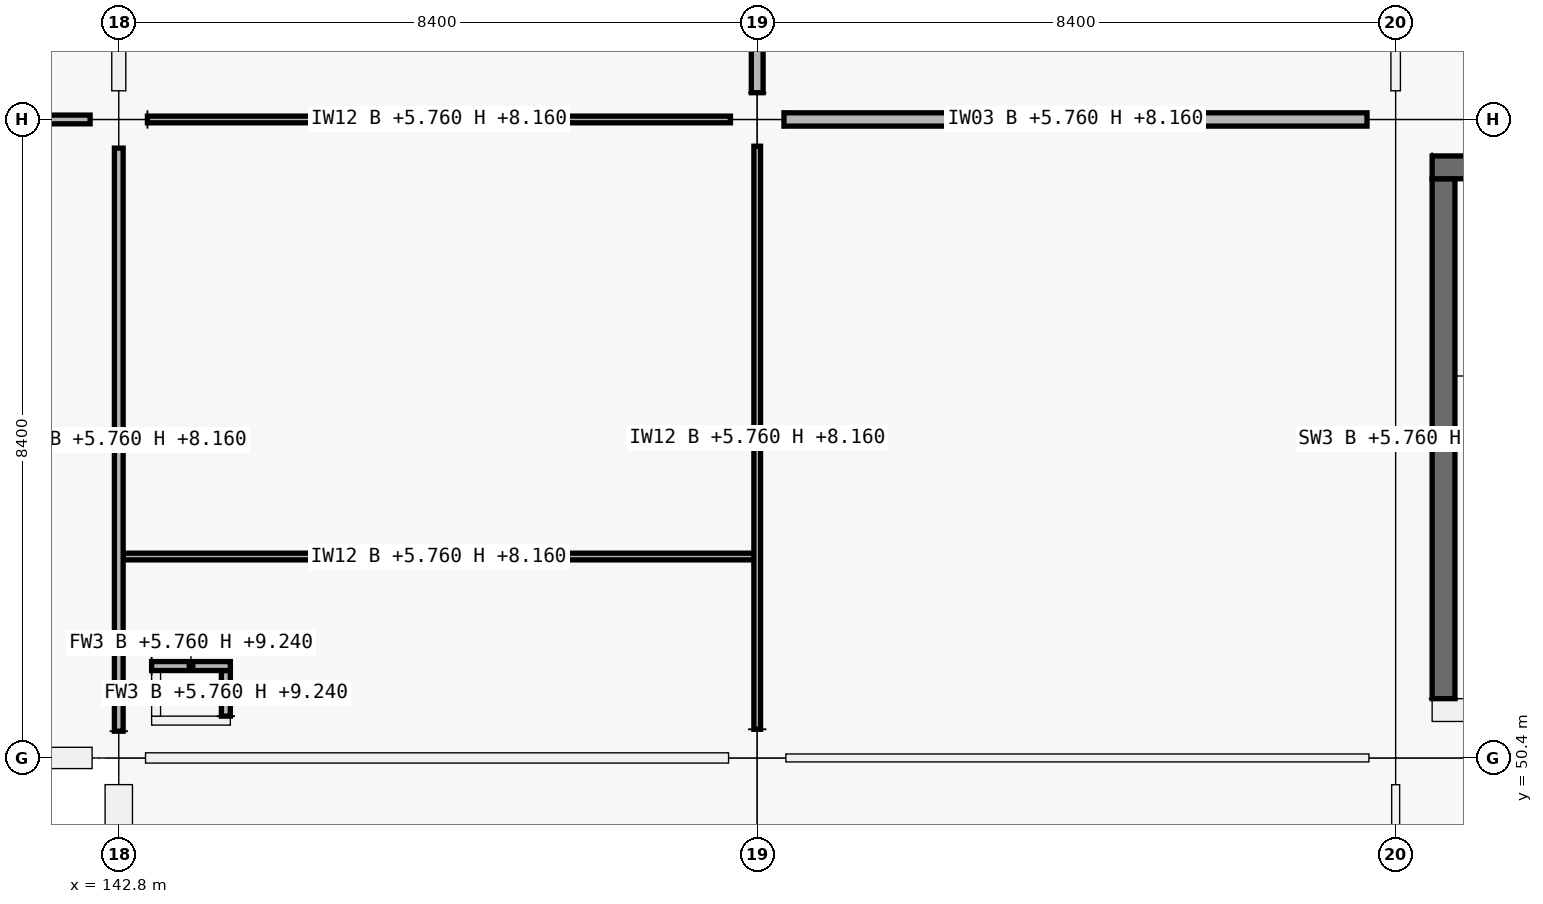
"""IFC4 building model, lengths in metres.
Left out: names, types, materials, properties, quantities, classifications, styles, units other than length and angle.
Written with IfcOpenShell. Run it as: python <this file> out.ifc"""

import sys

from ifc_helpers import new_model, si_unit, direction, frame, frame_2d, origin, origin_2d, place, context, subcontext, project, spatial, rectangle, extrude, element, fill, save


model = new_model("IFC4")
c1 = context("Model", 3, precision=1e-05, world=origin(), true_north=direction((0.0, 1.0)))
c2 = subcontext(c1, "Body", "Model", "MODEL_VIEW")
j1 = project(units=[si_unit("LENGTHUNIT", "METRE"), si_unit("PLANEANGLEUNIT", "RADIAN")], contexts=[c1])
p1 = place(None, origin())
s1 = spatial("IfcSite", under=j1, at=p1, CompositionType="ELEMENT")
p2 = place(p1, origin())
s2 = spatial("IfcBuilding", under=s1, at=p2, CompositionType="ELEMENT")
p3 = place(p2, frame((0.0, 0.0, 5.76)))
s3 = spatial("IfcBuildingStorey", under=s2, at=p3, CompositionType="ELEMENT", Elevation=5.76)
p4 = place(p3, frame((142.8, 50.4, 0.0), z_axis=(0.0, 0.0, 1.0), x_axis=(1.0, 0.0, 0.0)))
e1 = element("IfcColumn", 1, at=p4, inside=s3, PredefinedType="COLUMN", context=c2, shape_type="SweptSolid", body=[
    extrude(rectangle(XDim=0.7, YDim=0.7, at=origin_2d()), origin(), (0.0, 0.0, 1.0), 4.5),
])
for number, where, z_axis, x_axis in (
    (2, (142.8, 58.8, 0.0), (0.0, 0.0, 1.0), (1.0, 0.0, 0.0)),
    (3, (151.2, 50.4, 0.0), (0.0, 0.0, 1.0), (1.0, 0.0, 0.0)),
):
    element("IfcColumn", number, at=place(p3, frame(where, z_axis=z_axis, x_axis=x_axis)), inside=s3, PredefinedType="COLUMN", context=c2, shape_type="SweptSolid", body=[
        extrude(rectangle(XDim=0.75, YDim=0.75, at=origin_2d()), origin(), (0.0, 0.0, 1.0), 4.5),
    ])
for number, where, z_axis, x_axis in (
    (4, (151.2, 58.8, 0.0), (0.0, 0.0, 1.0), (1.0, 0.0, 0.0)),
    (5, (159.6, 50.4, 0.0), (0.0, 0.0, 1.0), (1.0, 0.0, 0.0)),
):
    element("IfcColumn", number, at=place(p3, frame(where, z_axis=z_axis, x_axis=x_axis)), inside=s3, PredefinedType="COLUMN", context=c2, shape_type="SweptSolid", body=[
        extrude(rectangle(XDim=0.7, YDim=0.7, at=origin_2d()), origin(), (0.0, 0.0, 1.0), 4.5),
    ])
p5 = place(p3, frame((159.6, 58.8, 0.0), z_axis=(0.0, 0.0, 1.0), x_axis=(1.0, 0.0, 0.0)))
e6 = element("IfcColumn", 6, at=p5, inside=s3, PredefinedType="COLUMN", context=c2, shape_type="SweptSolid", body=[
    extrude(rectangle(XDim=0.75, YDim=0.75, at=origin_2d()), origin(), (0.0, 0.0, 1.0), 4.5),
])
p6 = place(p3, frame((142.449, 50.4, 0.0), z_axis=(0.0, 0.0, 1.0), x_axis=(-1.0, 0.0, 0.0)))
e7 = element("IfcWall", 7, at=p6, inside=s3, PredefinedType="SOLIDWALL", context=c2, shape_type="SweptSolid", body=[
    extrude(rectangle(XDim=7.673, YDim=0.28, at=frame_2d((3.836, 0.0))), origin(), (0.0, 0.0, 1.0), 3.4),
])
p7 = place(p3, frame((142.8, 42.376, 0.0), z_axis=(0.0, 0.0, 1.0), x_axis=(0.0, 1.0, 0.0)))
e8 = element("IfcWall", 8, at=p7, inside=s3, PredefinedType="SOLIDWALL", context=c2, shape_type="SweptSolid", body=[
    extrude(rectangle(XDim=7.673, YDim=0.36, at=frame_2d((3.836, 0.0))), origin(), (0.0, 0.0, 1.0), 3.4),
])
p8 = place(p7, frame((3.386, 0.0, 0.9)))
e9 = element("IfcOpeningElement", 9, at=p8, cuts=e8, PredefinedType="OPENING", context=c2, shape_type="SweptSolid", body=[
    extrude(rectangle(XDim=0.9, YDim=1.5, at=frame_2d((0.45, 0.75))), frame((0.0, 0.18, 0.0), z_axis=(0.0, -1.0, 0.0), x_axis=(1.0, 0.0, 0.0)), (0.0, 0.0, 1.0), 0.36),
])
p9 = place(p3, frame((167.52, 51.03, 0.0), z_axis=(0.0, 0.0, 1.0), x_axis=(-1.0, 0.0, 0.0)))
e10 = element("IfcWall", 10, at=p9, inside=s3, PredefinedType="SHEAR", context=c2, shape_type="SweptSolid", body=[
    extrude(rectangle(XDim=7.44, YDim=0.3, at=frame_2d((3.72, 0.0))), origin(), (0.0, 0.0, 1.0), 4.5),
])
p10 = place(p9, frame((1.28, 0.0, 0.0)))
e11 = element("IfcOpeningElement", 11, at=p10, cuts=e10, PredefinedType="OPENING", context=c2, shape_type="SweptSolid", body=[
    extrude(rectangle(XDim=1.5, YDim=2.15, at=frame_2d((0.75, 1.075))), frame((0.0, 0.15, 0.0), z_axis=(0.0, -1.0, 0.0), x_axis=(1.0, 0.0, 0.0)), (0.0, 0.0, 1.0), 0.3),
])
p11 = place(p3, frame((160.23, 51.18, 0.0), z_axis=(0.0, 0.0, 1.0), x_axis=(0.0, 1.0, 0.0)))
e12 = element("IfcWall", 12, at=p11, inside=s3, PredefinedType="SHEAR", context=c2, shape_type="SweptSolid", body=[
    extrude(rectangle(XDim=6.84, YDim=0.3, at=frame_2d((3.42, 0.0))), origin(), (0.0, 0.0, 1.0), 4.5),
])
p12 = place(p3, frame((160.08, 58.17, 0.0), z_axis=(0.0, 0.0, 1.0), x_axis=(1.0, 0.0, 0.0)))
e13 = element("IfcWall", 13, at=p12, inside=s3, PredefinedType="SHEAR", context=c2, shape_type="SweptSolid", body=[
    extrude(rectangle(XDim=7.44, YDim=0.3, at=frame_2d((3.72, 0.0))), origin(), (0.0, 0.0, 1.0), 4.5),
])
for number, where, z_axis, x_axis in (
    (14, (143.232, 50.891, 0.0), (0.0, 0.0, 1.0), (1.0, 0.0, 0.0)),
    (15, (143.232, 51.609, 0.0), (0.0, 0.0, 1.0), (1.0, 0.0, 0.0)),
):
    element("IfcWall", number, at=place(p3, frame(where, z_axis=z_axis, x_axis=x_axis)), inside=s3, PredefinedType="PARTITIONING", context=c2, shape_type="SweptSolid", body=[
        extrude(rectangle(XDim=1.036, YDim=0.118, at=frame_2d((0.518, 0.0))), origin(), (0.0, 0.0, 1.0), 3.48),
    ])
for number, where, z_axis, x_axis in (
    (16, (143.291, 50.95, 0.0), (0.0, 0.0, 1.0), (0.0, 1.0, 0.0)),
    (17, (144.209, 50.95, 0.0), (0.0, 0.0, 1.0), (0.0, 1.0, 0.0)),
):
    element("IfcWall", number, at=place(p3, frame(where, z_axis=z_axis, x_axis=x_axis)), inside=s3, PredefinedType="PARTITIONING", context=c2, shape_type="SweptSolid", body=[
        extrude(rectangle(XDim=0.6, YDim=0.118, at=frame_2d((0.3, 0.0))), origin(), (0.0, 0.0, 1.0), 3.48),
    ])
p13 = place(p3, frame((134.752, 58.8, 0.0), z_axis=(0.0, 0.0, 1.0), x_axis=(1.0, 0.0, 0.0)))
e18 = element("IfcWall", 18, at=p13, inside=s3, PredefinedType="PARTITIONING", context=c2, shape_type="SweptSolid", body=[
    extrude(rectangle(XDim=7.671, YDim=0.115, at=frame_2d((3.835, 0.0))), origin(), (0.0, 0.0, 1.0), 2.4),
])
p14 = place(p13, frame((3.356, 0.0, 0.0)))
e19 = element("IfcOpeningElement", 19, at=p14, cuts=e18, PredefinedType="OPENING", context=c2, shape_type="SweptSolid", body=[
    extrude(rectangle(XDim=0.96, YDim=2.18, at=frame_2d((0.48, 1.09))), frame((0.0, 0.058, 0.0), z_axis=(0.0, -1.0, 0.0), x_axis=(1.0, 0.0, 0.0)), (0.0, 0.0, 1.0), 0.115),
])
p15 = place(p3, frame((143.152, 50.4, 0.0), z_axis=(0.0, 0.0, 1.0), x_axis=(1.0, 0.0, 0.0)))
e20 = element("IfcWall", 20, at=p15, inside=s3, PredefinedType="PARTITIONING", context=c2, shape_type="SweptSolid", body=[
    extrude(rectangle(XDim=7.671, YDim=0.135, at=frame_2d((3.835, 0.0))), origin(), (0.0, 0.0, 1.0), 2.4),
])
p16 = place(p3, frame((143.177, 58.8, 0.0), z_axis=(0.0, 0.0, 1.0), x_axis=(1.0, 0.0, 0.0)))
e21 = element("IfcWall", 21, at=p16, inside=s3, PredefinedType="PARTITIONING", context=c2, shape_type="SweptSolid", body=[
    extrude(rectangle(XDim=7.671, YDim=0.088, at=frame_2d((3.835, 0.0))), origin(), (0.0, 0.0, 1.0), 2.4),
])
p17 = place(p3, frame((151.577, 50.4, 0.0), z_axis=(0.0, 0.0, 1.0), x_axis=(1.0, 0.0, 0.0)))
e22 = element("IfcWall", 22, at=p17, inside=s3, PredefinedType="PARTITIONING", context=c2, shape_type="SweptSolid", body=[
    extrude(rectangle(XDim=7.671, YDim=0.105, at=frame_2d((3.835, 0.0))), origin(), (0.0, 0.0, 1.0), 2.4),
])
p18 = place(p17, frame((3.365, 0.0, 0.0)))
e23 = element("IfcOpeningElement", 23, at=p18, cuts=e22, PredefinedType="OPENING", context=c2, shape_type="SweptSolid", body=[
    extrude(rectangle(XDim=0.94, YDim=2.15, at=frame_2d((0.47, 1.075))), frame((0.0, 0.052, 0.0), z_axis=(0.0, -1.0, 0.0), x_axis=(1.0, 0.0, 0.0)), (0.0, 0.0, 1.0), 0.105),
])
p19 = place(p3, frame((151.552, 58.8, 0.0), z_axis=(0.0, 0.0, 1.0), x_axis=(1.0, 0.0, 0.0)))
e24 = element("IfcWall", 24, at=p19, inside=s3, PredefinedType="PARTITIONING", context=c2, shape_type="SweptSolid", body=[
    extrude(rectangle(XDim=7.671, YDim=0.175, at=frame_2d((3.835, 0.0))), origin(), (0.0, 0.0, 1.0), 2.4),
])
p20 = place(p19, frame((3.376, 0.0, 0.0)))
e25 = element("IfcOpeningElement", 25, at=p20, cuts=e24, PredefinedType="OPENING", context=c2, shape_type="SweptSolid", body=[
    extrude(rectangle(XDim=0.92, YDim=2.15, at=frame_2d((0.46, 1.075))), frame((0.0, 0.087, 0.0), z_axis=(0.0, -1.0, 0.0), x_axis=(1.0, 0.0, 0.0)), (0.0, 0.0, 1.0), 0.175),
])
p21 = place(p3, frame((142.8, 50.752, 0.0), z_axis=(0.0, 0.0, 1.0), x_axis=(0.0, 1.0, 0.0)))
e26 = element("IfcWall", 26, at=p21, inside=s3, PredefinedType="PARTITIONING", context=c2, shape_type="SweptSolid", body=[
    extrude(rectangle(XDim=7.671, YDim=0.115, at=frame_2d((3.835, 0.0))), origin(), (0.0, 0.0, 1.0), 2.4),
])
p22 = place(p21, frame((0.623, 0.0, 0.0)))
e27 = element("IfcOpeningElement", 27, at=p22, cuts=e26, PredefinedType="OPENING", context=c2, shape_type="SweptSolid", body=[
    extrude(rectangle(XDim=0.98, YDim=2.08, at=frame_2d((0.49, 1.04))), frame((0.0, 0.058, 0.0), z_axis=(0.0, -1.0, 0.0), x_axis=(1.0, 0.0, 0.0)), (0.0, 0.0, 1.0), 0.115),
])
p23 = place(p21, frame((4.563, 0.0, 0.0)))
e28 = element("IfcOpeningElement", 28, at=p23, cuts=e26, PredefinedType="OPENING", context=c2, shape_type="SweptSolid", body=[
    extrude(rectangle(XDim=0.94, YDim=2.08, at=frame_2d((0.47, 1.04))), frame((0.0, 0.058, 0.0), z_axis=(0.0, -1.0, 0.0), x_axis=(1.0, 0.0, 0.0)), (0.0, 0.0, 1.0), 0.115),
])
p24 = place(p3, frame((142.8, 59.177, 0.0), z_axis=(0.0, 0.0, 1.0), x_axis=(0.0, 1.0, 0.0)))
e29 = element("IfcWall", 29, at=p24, inside=s3, PredefinedType="PARTITIONING", context=c2, shape_type="SweptSolid", body=[
    extrude(rectangle(XDim=7.671, YDim=0.185, at=frame_2d((3.835, 0.0))), origin(), (0.0, 0.0, 1.0), 2.4),
])
p25 = place(p24, frame((3.376, 0.0, 0.0)))
e30 = element("IfcOpeningElement", 30, at=p25, cuts=e29, PredefinedType="OPENING", context=c2, shape_type="SweptSolid", body=[
    extrude(rectangle(XDim=0.92, YDim=2.15, at=frame_2d((0.46, 1.075))), frame((0.0, 0.093, 0.0), z_axis=(0.0, -1.0, 0.0), x_axis=(1.0, 0.0, 0.0)), (0.0, 0.0, 1.0), 0.185),
])
p26 = place(p3, frame((151.2, 50.777, 0.0), z_axis=(0.0, 0.0, 1.0), x_axis=(0.0, 1.0, 0.0)))
e31 = element("IfcWall", 31, at=p26, inside=s3, PredefinedType="PARTITIONING", context=c2, shape_type="SweptSolid", body=[
    extrude(rectangle(XDim=7.671, YDim=0.088, at=frame_2d((3.835, 0.0))), origin(), (0.0, 0.0, 1.0), 2.4),
])
p27 = place(p3, frame((151.2, 59.152, 0.0), z_axis=(0.0, 0.0, 1.0), x_axis=(0.0, 1.0, 0.0)))
e32 = element("IfcWall", 32, at=p27, inside=s3, PredefinedType="PARTITIONING", context=c2, shape_type="SweptSolid", body=[
    extrude(rectangle(XDim=7.671, YDim=0.155, at=frame_2d((3.835, 0.0))), origin(), (0.0, 0.0, 1.0), 2.4),
])
p28 = place(p27, frame((3.331, 0.0, 0.0)))
e33 = element("IfcOpeningElement", 33, at=p28, cuts=e32, PredefinedType="OPENING", context=c2, shape_type="SweptSolid", body=[
    extrude(rectangle(XDim=1.01, YDim=2.12, at=frame_2d((0.505, 1.06))), frame((0.0, 0.078, 0.0), z_axis=(0.0, -1.0, 0.0), x_axis=(1.0, 0.0, 0.0)), (0.0, 0.0, 1.0), 0.155),
])
p29 = place(p3, frame((159.6, 42.377, 0.0), z_axis=(0.0, 0.0, 1.0), x_axis=(0.0, 1.0, 0.0)))
e34 = element("IfcWall", 34, at=p29, inside=s3, PredefinedType="PARTITIONING", context=c2, shape_type="SweptSolid", body=[
    extrude(rectangle(XDim=7.671, YDim=0.105, at=frame_2d((3.835, 0.0))), origin(), (0.0, 0.0, 1.0), 2.4),
])
p30 = place(p29, frame((3.311, 0.0, 0.0)))
e35 = element("IfcOpeningElement", 35, at=p30, cuts=e34, PredefinedType="OPENING", context=c2, shape_type="SweptSolid", body=[
    extrude(rectangle(XDim=1.05, YDim=2.12, at=frame_2d((0.525, 1.06))), frame((0.0, 0.052, 0.0), z_axis=(0.0, -1.0, 0.0), x_axis=(1.0, 0.0, 0.0)), (0.0, 0.0, 1.0), 0.105),
])
p31 = place(p3, frame((159.6, 59.177, 0.0), z_axis=(0.0, 0.0, 1.0), x_axis=(0.0, 1.0, 0.0)))
e36 = element("IfcWall", 36, at=p31, inside=s3, PredefinedType="PARTITIONING", context=c2, shape_type="SweptSolid", body=[
    extrude(rectangle(XDim=7.671, YDim=0.125, at=frame_2d((3.835, 0.0))), origin(), (0.0, 0.0, 1.0), 2.4),
])
p32 = place(p31, frame((3.331, 0.0, 0.0)))
e37 = element("IfcOpeningElement", 37, at=p32, cuts=e36, PredefinedType="OPENING", context=c2, shape_type="SweptSolid", body=[
    extrude(rectangle(XDim=1.01, YDim=2.12, at=frame_2d((0.505, 1.06))), frame((0.0, 0.062, 0.0), z_axis=(0.0, -1.0, 0.0), x_axis=(1.0, 0.0, 0.0)), (0.0, 0.0, 1.0), 0.125),
])
p33 = place(p3, frame((142.86, 53.05, 0.0), z_axis=(0.0, 0.0, 1.0), x_axis=(1.0, 0.0, 0.0)))
e38 = element("IfcWall", 38, at=p33, inside=s3, PredefinedType="PARTITIONING", context=c2, shape_type="SweptSolid", body=[
    extrude(rectangle(XDim=8.294, YDim=0.088, at=frame_2d((4.147, 0.0))), origin(), (0.0, 0.0, 1.0), 2.4),
])
p34 = place(p22, origin())
e39 = element("IfcDoor", 39, at=p34, inside=s3, OperationType="SINGLE_SWING_RIGHT", PredefinedType="DOOR", context=c2, shape_type="SweptSolid", body=[
    extrude(rectangle(XDim=0.98, YDim=2.08, at=frame_2d((0.49, 1.04))), frame((0.0, 0.025, 0.0), z_axis=(0.0, -1.0, 0.0), x_axis=(1.0, 0.0, 0.0)), (0.0, 0.0, 1.0), 0.05),
])
fill(e27, e39)
p35 = place(p23, origin())
e40 = element("IfcDoor", 40, at=p35, inside=s3, OperationType="SINGLE_SWING_LEFT", PredefinedType="DOOR", context=c2, shape_type="SweptSolid", body=[
    extrude(rectangle(XDim=0.94, YDim=2.08, at=frame_2d((0.47, 1.04))), frame((0.0, 0.025, 0.0), z_axis=(0.0, -1.0, 0.0), x_axis=(1.0, 0.0, 0.0)), (0.0, 0.0, 1.0), 0.05),
])
fill(e28, e40)
p36 = place(p18, origin())
e41 = element("IfcDoor", 41, at=p36, inside=s3, OperationType="SINGLE_SWING_LEFT", PredefinedType="DOOR", context=c2, shape_type="SweptSolid", body=[
    extrude(rectangle(XDim=0.94, YDim=2.15, at=frame_2d((0.47, 1.075))), frame((0.0, 0.025, 0.0), z_axis=(0.0, -1.0, 0.0), x_axis=(1.0, 0.0, 0.0)), (0.0, 0.0, 1.0), 0.05),
])
fill(e23, e41)
p37 = place(p20, origin())
e42 = element("IfcDoor", 42, at=p37, inside=s3, OperationType="SINGLE_SWING_RIGHT", PredefinedType="DOOR", context=c2, shape_type="SweptSolid", body=[
    extrude(rectangle(XDim=0.92, YDim=2.15, at=frame_2d((0.46, 1.075))), frame((0.0, 0.025, 0.0), z_axis=(0.0, -1.0, 0.0), x_axis=(1.0, 0.0, 0.0)), (0.0, 0.0, 1.0), 0.05),
])
fill(e25, e42)
save(model, sys.argv[1])
